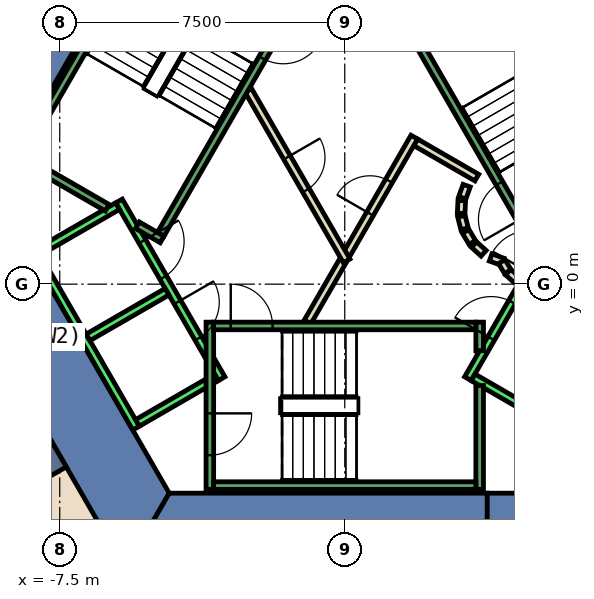
"""IFC4 building model, lengths in metres.
Left out: names, types, materials, properties, quantities, classifications, styles, units other than length and angle.
Written with IfcOpenShell. Run it as: python <this file> out.ifc"""

import sys

from ifc_helpers import new_model, si_unit, direction, frame, frame_2d, origin, place, context, subcontext, project, spatial, polyline, rectangle, outline, extrude, element, fill, save


model = new_model("IFC4")
c1 = context("Model", 3, precision=1e-05, world=origin(), true_north=direction((0.0, 1.0)))
c2 = subcontext(c1, "Body", "Model", "MODEL_VIEW")
j1 = project(units=[si_unit("LENGTHUNIT", "METRE"), si_unit("PLANEANGLEUNIT", "RADIAN")], contexts=[c1])
p1 = place(None, origin())
s1 = spatial("IfcSite", under=j1, at=p1, CompositionType="ELEMENT")
p2 = place(p1, origin())
s2 = spatial("IfcBuilding", under=s1, at=p2, CompositionType="ELEMENT")
p3 = place(p2, frame((0.0, 0.0, 281.0)))
s3 = spatial("IfcBuildingStorey", under=s2, at=p3, CompositionType="ELEMENT", Elevation=281.0)
p4 = place(p3, frame((0.0, 0.0, -0.6)))
e1 = element("IfcWall", 1, at=p4, inside=s3, PredefinedType="SHEAR", context=c2, shape_type="SweptSolid", body=[
    extrude(outline(polyline([(-10.535, 4.253), (-8.803, 3.253), (-4.619, 10.5), (-5.774, 12.5), (-10.535, 4.253)])), origin(), (0.0, 0.0, 1.0), 5.4),
])
p5 = place(p3, frame((0.0, 0.0, -0.6)))
e2 = element("IfcWall", 2, at=p5, inside=s3, PredefinedType="SHEAR", context=c2, shape_type="SweptSolid", body=[
    extrude(outline(polyline([(-11.547, 2.5), (-5.774, -7.5), (-4.619, -5.5), (-9.238, 2.5), (-11.547, 2.5)])), origin(), (0.0, 0.0, 1.0), 5.4),
])
p6 = place(p3, frame((0.0, 0.0, -0.6)))
e3 = element("IfcWall", 3, at=p6, inside=s3, PredefinedType="SHEAR", context=c2, shape_type="SweptSolid", body=[
    extrude(outline(polyline([(3.75, -7.5), (3.75, -5.5), (-4.619, -5.5), (-5.774, -7.5), (3.75, -7.5)])), origin(), (0.0, 0.0, 1.0), 5.4),
])
p7 = place(p3, frame((0.0, 0.0, 3.6)))
e4 = element("IfcWall", 4, at=p7, inside=s3, PredefinedType="SHEAR", context=c2, shape_type="SweptSolid", body=[
    extrude(outline(polyline([(5.544, -7.5), (5.544, -7.102), (4.619, -5.5), (3.75, -5.5), (3.75, -7.5), (5.544, -7.5)])), origin(), (0.0, 0.0, 1.0), 1.2),
])
p8 = place(p3, frame((-7.578, -4.375, 0.0), z_axis=(0.0, 0.0, 1.0), x_axis=(-0.866020754303, -0.500008053052, 0.0)))
e5 = element("IfcWall", 5, at=p8, inside=s3, PredefinedType="SHEAR", context=c2, shape_type="SweptSolid", body=[
    extrude(rectangle(XDim=20.374, YDim=1.0, at=frame_2d((10.187, 0.0))), origin(), (0.0, 0.0, 1.0), 4.8),
])
p9 = place(p3, frame((-0.982, -1.0, 0.0), z_axis=(0.0, 0.0, 1.0), x_axis=(0.50024047865, 0.865886518847, 0.0)))
e6 = element("IfcWall", 6, at=p9, inside=s3, PredefinedType="PARTITIONING", context=c2, shape_type="SweptSolid", body=[
    extrude(rectangle(XDim=1.863, YDim=0.2, at=frame_2d((0.931, 0.0))), origin(), (0.0, 0.0, 1.0), 4.8),
])
p10 = place(p3, frame((1.866, 3.732, 0.0), z_axis=(0.0, 0.0, 1.0), x_axis=(0.866043361281, -0.499968895414, 0.0)))
e7 = element("IfcWall", 7, at=p10, inside=s3, PredefinedType="PARTITIONING", context=c2, shape_type="SweptSolid", body=[
    extrude(rectangle(XDim=1.858, YDim=0.2, at=frame_2d((0.929, 0.0))), origin(), (0.0, 0.0, 1.0), 4.8),
])
p11 = place(p3, frame((3.208, 2.592, 0.0), z_axis=(0.0, 0.0, 1.0), x_axis=(-0.337388820924, -0.941365382578, 0.0)))
e8 = element("IfcWall", 8, at=p11, inside=s3, PredefinedType="PARTITIONING", context=c2, shape_type="SweptSolid", body=[
    extrude(rectangle(XDim=0.338, YDim=0.2, at=frame_2d((0.169, 0.0))), origin(), (0.0, 0.0, 1.0), 4.8),
])
p12 = place(p3, frame((3.079, 2.199, 0.0), z_axis=(0.0, 0.0, 1.0), x_axis=(-0.047771483479, -0.998858290933, 0.0)))
e9 = element("IfcWall", 9, at=p12, inside=s3, PredefinedType="PARTITIONING", context=c2, shape_type="SweptSolid", body=[
    extrude(rectangle(XDim=0.337, YDim=0.2, at=frame_2d((0.169, 0.0))), origin(), (0.0, 0.0, 1.0), 4.8),
])
p13 = place(p3, frame((3.07, 1.786, 0.0), z_axis=(0.0, 0.0, 1.0), x_axis=(0.242705583207, -0.970099994784, 0.0)))
e10 = element("IfcWall", 10, at=p13, inside=s3, PredefinedType="PARTITIONING", context=c2, shape_type="SweptSolid", body=[
    extrude(rectangle(XDim=0.338, YDim=0.2, at=frame_2d((0.169, 0.0))), origin(), (0.0, 0.0, 1.0), 4.8),
])
for number, where, z_axis, x_axis in (
    (11, (3.182, 1.388, 0.0), (0.0, 0.0, 1.0), (0.512, -0.859, 0.0)),
    (12, (3.404, 1.039, 0.0), (0.0, 0.0, 1.0), (0.74, -0.672, 0.0)),
):
    element("IfcWall", number, at=place(p3, frame(where, z_axis=z_axis, x_axis=x_axis)), inside=s3, PredefinedType="PARTITIONING", context=c2, shape_type="SweptSolid", body=[
        extrude(rectangle(XDim=0.338, YDim=0.2, at=frame_2d((0.169, 0.0))), origin(), (0.0, 0.0, 1.0), 4.8),
    ])
p14 = place(p3, frame((3.838, 0.702, 0.0), z_axis=(0.0, 0.0, 1.0), x_axis=(0.941035081519, -0.338308993895, 0.0)))
e13 = element("IfcWall", 13, at=p14, inside=s3, PredefinedType="PARTITIONING", context=c2, shape_type="SweptSolid", body=[
    extrude(rectangle(XDim=0.337, YDim=0.2, at=frame_2d((0.168, 0.0))), origin(), (0.0, 0.0, 1.0), 4.8),
])
p15 = place(p3, frame((4.132, 0.593, 0.0), z_axis=(0.0, 0.0, 1.0), x_axis=(0.513561617048, -0.858052717201, 0.0)))
e14 = element("IfcWall", 14, at=p15, inside=s3, PredefinedType="PARTITIONING", context=c2, shape_type="SweptSolid", body=[
    extrude(rectangle(XDim=0.308, YDim=0.2, at=frame_2d((0.154, 0.0))), origin(), (0.0, 0.0, 1.0), 4.8),
])
p16 = place(p3, frame((4.301, 0.315, 0.0), z_axis=(0.0, 0.0, 1.0), x_axis=(0.741798017506, -0.670623367639, 0.0)))
e15 = element("IfcWall", 15, at=p16, inside=s3, PredefinedType="PARTITIONING", context=c2, shape_type="SweptSolid", body=[
    extrude(rectangle(XDim=0.309, YDim=0.2, at=frame_2d((0.154, 0.0))), origin(), (0.0, 0.0, 1.0), 4.8),
])
p17 = place(p3, frame((0.05, 0.787, 0.0), z_axis=(0.0, 0.0, 1.0), x_axis=(0.499954076797, 0.866051915934, 0.0)))
e16 = element("IfcWall", 16, at=p17, inside=s3, PredefinedType="PARTITIONING", context=c2, shape_type="SweptSolid", body=[
    extrude(rectangle(XDim=3.558, YDim=0.2, at=frame_2d((1.779, 0.0))), origin(), (0.0, 0.0, 1.0), 4.8),
])
p18 = place(p17, frame((1.229, 0.0, 0.0)))
e17 = element("IfcOpeningElement", 17, at=p18, cuts=e16, PredefinedType="OPENING", context=c2, shape_type="SweptSolid", body=[
    extrude(rectangle(XDim=1.0, YDim=2.1, at=frame_2d((0.5, 1.05))), frame((0.0, 0.11, 0.0), z_axis=(0.0, -1.0, 0.0), x_axis=(1.0, 0.0, 0.0)), (0.0, 0.0, 1.0), 0.22),
])
p19 = place(p3, frame((-2.54, 5.1, 0.0), z_axis=(0.0, 0.0, 1.0), x_axis=(0.499925051871, -0.866068670783, 0.0)))
e18 = element("IfcWall", 18, at=p19, inside=s3, PredefinedType="PARTITIONING", context=c2, shape_type="SweptSolid", body=[
    extrude(rectangle(XDim=5.181, YDim=0.2, at=frame_2d((2.59, 0.0))), origin(), (0.0, 0.0, 1.0), 4.8),
])
p20 = place(p19, frame((2.04, 0.0, 0.0)))
e19 = element("IfcOpeningElement", 19, at=p20, cuts=e18, PredefinedType="OPENING", context=c2, shape_type="SweptSolid", body=[
    extrude(rectangle(XDim=1.0, YDim=2.1, at=frame_2d((0.5, 1.05))), frame((0.0, 0.11, 0.0), z_axis=(0.0, -1.0, 0.0), x_axis=(1.0, 0.0, 0.0)), (0.0, 0.0, 1.0), 0.22),
])
p21 = place(p3, frame((-5.94, 2.188, 0.0), z_axis=(0.0, 0.0, 1.0), x_axis=(0.500034260056, -0.866005622828, 0.0)))
e20 = element("IfcWall", 20, at=p21, inside=s3, PredefinedType="STANDARD", context=c2, shape_type="SweptSolid", body=[
    extrude(rectangle(XDim=5.399, YDim=0.2, at=frame_2d((2.7, 0.0))), origin(), (0.0, 0.0, 1.0), 4.8),
])
p22 = place(p21, frame((3.075, 0.0, 0.0)))
e21 = element("IfcOpeningElement", 21, at=p22, cuts=e20, PredefinedType="OPENING", context=c2, shape_type="SweptSolid", body=[
    extrude(rectangle(XDim=1.1, YDim=2.1, at=frame_2d((0.55, 1.05))), frame((0.0, 0.11, 0.0), z_axis=(0.0, -1.0, 0.0), x_axis=(1.0, 0.0, 0.0)), (0.0, 0.0, 1.0), 0.22),
])
p23 = place(p21, frame((1.225, 0.0, 0.0)))
e22 = element("IfcOpeningElement", 22, at=p23, cuts=e20, PredefinedType="OPENING", context=c2, shape_type="SweptSolid", body=[
    extrude(rectangle(XDim=1.1, YDim=2.1, at=frame_2d((0.55, 1.05))), frame((0.0, 0.11, 0.0), z_axis=(0.0, -1.0, 0.0), x_axis=(1.0, 0.0, 0.0)), (0.0, 0.0, 1.0), 0.22),
])
p24 = place(p3, frame((-8.192, 0.888, 0.0), z_axis=(0.0, 0.0, 1.0), x_axis=(0.500034260056, -0.866005622828, 0.0)))
e23 = element("IfcWall", 23, at=p24, inside=s3, PredefinedType="STANDARD", context=c2, shape_type="SweptSolid", body=[
    extrude(rectangle(XDim=5.399, YDim=0.2, at=frame_2d((2.7, 0.0))), origin(), (0.0, 0.0, 1.0), 4.8),
])
for number, where, z_axis, x_axis in (
    (24, (-5.977, 2.052, 0.0), (0.0, 0.0, 1.0), (-0.866, -0.5, 0.0)),
    (25, (-4.677, -0.2, 0.0), (0.0, 0.0, 1.0), (-0.866, -0.5, 0.0)),
):
    element("IfcWall", number, at=place(p3, frame(where, z_axis=z_axis, x_axis=x_axis)), inside=s3, PredefinedType="STANDARD", context=c2, shape_type="SweptSolid", body=[
        extrude(rectangle(XDim=2.399, YDim=0.2, at=frame_2d((1.2, 0.0))), origin(), (0.0, 0.0, 1.0), 4.8),
    ])
p25 = place(p3, frame((-3.377, -2.452, 0.0), z_axis=(0.0, 0.0, 1.0), x_axis=(-0.865955154139, -0.50012165622, 0.0)))
e26 = element("IfcWall", 26, at=p25, inside=s3, PredefinedType="STANDARD", context=c2, shape_type="SweptSolid", body=[
    extrude(rectangle(XDim=2.4, YDim=0.2, at=frame_2d((1.2, 0.0))), origin(), (0.0, 0.0, 1.0), 4.8),
])
p26 = place(p3, frame((3.24, -2.488, 0.0), z_axis=(0.0, 0.0, 1.0), x_axis=(0.500034260056, 0.866005622828, 0.0)))
e27 = element("IfcWall", 27, at=p26, inside=s3, PredefinedType="STANDARD", context=c2, shape_type="SweptSolid", body=[
    extrude(rectangle(XDim=5.399, YDim=0.2, at=frame_2d((2.7, 0.0))), origin(), (0.0, 0.0, 1.0), 4.8),
])
p27 = place(p26, frame((3.225, 0.0, 0.0)))
e28 = element("IfcOpeningElement", 28, at=p27, cuts=e27, PredefinedType="OPENING", context=c2, shape_type="SweptSolid", body=[
    extrude(rectangle(XDim=1.1, YDim=2.1, at=frame_2d((0.55, 1.05))), frame((0.0, 0.11, 0.0), z_axis=(0.0, -1.0, 0.0), x_axis=(1.0, 0.0, 0.0)), (0.0, 0.0, 1.0), 0.22),
])
p28 = place(p26, frame((1.225, 0.0, 0.0)))
e29 = element("IfcOpeningElement", 29, at=p28, cuts=e27, PredefinedType="OPENING", context=c2, shape_type="SweptSolid", body=[
    extrude(rectangle(XDim=1.1, YDim=2.1, at=frame_2d((0.55, 1.05))), frame((0.0, 0.11, 0.0), z_axis=(0.0, -1.0, 0.0), x_axis=(1.0, 0.0, 0.0)), (0.0, 0.0, 1.0), 0.22),
])
p29 = place(p3, frame((3.377, -2.452, 0.0), z_axis=(0.0, 0.0, 1.0), x_axis=(0.865955154139, -0.50012165622, 0.0)))
e30 = element("IfcWall", 30, at=p29, inside=s3, PredefinedType="STANDARD", context=c2, shape_type="SweptSolid", body=[
    extrude(rectangle(XDim=2.4, YDim=0.2, at=frame_2d((1.2, 0.0))), origin(), (0.0, 0.0, 1.0), 4.8),
])
p30 = place(p3, frame((-3.55, -1.0, 0.0), z_axis=(0.0, 0.0, 1.0), x_axis=(0.0, -1.0, 0.0)))
e31 = element("IfcWall", 31, at=p30, inside=s3, PredefinedType="STANDARD", context=c2, shape_type="SweptSolid", body=[
    extrude(rectangle(XDim=4.4, YDim=0.2, at=frame_2d((2.2, 0.0))), origin(), (0.0, 0.0, 1.0), 4.8),
])
p31 = place(p30, frame((2.4, 0.0, 0.0)))
e32 = element("IfcOpeningElement", 32, at=p31, cuts=e31, PredefinedType="OPENING", context=c2, shape_type="SweptSolid", body=[
    extrude(rectangle(XDim=1.1, YDim=2.2, at=frame_2d((0.55, 1.1))), frame((0.0, 0.11, 0.0), z_axis=(0.0, -1.0, 0.0), x_axis=(1.0, 0.0, 0.0)), (0.0, 0.0, 1.0), 0.22),
])
p32 = place(p3, frame((3.55, -2.667, 0.0), z_axis=(0.0, 0.0, 1.0), x_axis=(0.0, -1.0, 0.0)))
e33 = element("IfcWall", 33, at=p32, inside=s3, PredefinedType="STANDARD", context=c2, shape_type="SweptSolid", body=[
    extrude(rectangle(XDim=2.733, YDim=0.2, at=frame_2d((1.366, 0.0))), origin(), (0.0, 0.0, 1.0), 4.8),
])
p33 = place(p3, frame((3.55, -1.0, 0.0), z_axis=(0.0, 0.0, 1.0), x_axis=(0.0, -1.0, 0.0)))
e34 = element("IfcWall", 34, at=p33, inside=s3, PredefinedType="STANDARD", context=c2, shape_type="SweptSolid", body=[
    extrude(rectangle(XDim=0.751, YDim=0.2, at=frame_2d((0.375, 0.0))), origin(), (0.0, 0.0, 1.0), 4.8),
])
p34 = place(p3, frame((-3.45, -1.1, 0.0), z_axis=(0.0, 0.0, 1.0), x_axis=(1.0, 0.0, 0.0)))
e35 = element("IfcWall", 35, at=p34, inside=s3, PredefinedType="STANDARD", context=c2, shape_type="SweptSolid", body=[
    extrude(rectangle(XDim=6.9, YDim=0.2, at=frame_2d((3.45, 0.0))), origin(), (0.0, 0.0, 1.0), 4.8),
])
p35 = place(p34, frame((0.45, 0.0, 0.0)))
e36 = element("IfcOpeningElement", 36, at=p35, cuts=e35, PredefinedType="OPENING", context=c2, shape_type="SweptSolid", body=[
    extrude(rectangle(XDim=1.1, YDim=2.2, at=frame_2d((0.55, 1.1))), frame((0.0, 0.11, 0.0), z_axis=(0.0, -1.0, 0.0), x_axis=(1.0, 0.0, 0.0)), (0.0, 0.0, 1.0), 0.22),
])
p36 = place(p3, frame((-3.45, -5.3, 0.0), z_axis=(0.0, 0.0, 1.0), x_axis=(1.0, 0.0, 0.0)))
e37 = element("IfcWall", 37, at=p36, inside=s3, PredefinedType="STANDARD", context=c2, shape_type="SweptSolid", body=[
    extrude(rectangle(XDim=6.9, YDim=0.2, at=frame_2d((3.45, 0.0))), origin(), (0.0, 0.0, 1.0), 4.8),
])
p37 = place(p3, frame((4.843, 1.312, 0.0), z_axis=(0.0, 0.0, 1.0), x_axis=(-0.499963383562, 0.866046543262, 0.0)))
e38 = element("IfcWall", 38, at=p37, inside=s3, PredefinedType="STANDARD", context=c2, shape_type="SweptSolid", body=[
    extrude(rectangle(XDim=6.9, YDim=0.2, at=frame_2d((3.45, 0.0))), origin(), (0.0, 0.0, 1.0), 4.8),
])
p38 = place(p37, frame((0.45, 0.0, 0.0)))
e39 = element("IfcOpeningElement", 39, at=p38, cuts=e38, PredefinedType="OPENING", context=c2, shape_type="SweptSolid", body=[
    extrude(rectangle(XDim=1.1, YDim=2.2, at=frame_2d((0.55, 1.1))), frame((0.0, 0.11, 0.0), z_axis=(0.0, -1.0, 0.0), x_axis=(1.0, 0.0, 0.0)), (0.0, 0.0, 1.0), 0.22),
])
p39 = place(p3, frame((-6.25, 2.01, 0.0), z_axis=(0.0, 0.0, 1.0), x_axis=(-0.86611865017, 0.499838457731, 0.0)))
e40 = element("IfcWall", 40, at=p39, inside=s3, PredefinedType="STANDARD", context=c2, shape_type="SweptSolid", body=[
    extrude(rectangle(XDim=2.733, YDim=0.2, at=frame_2d((1.366, 0.0))), origin(), (0.0, 0.0, 1.0), 4.8),
])
p40 = place(p3, frame((-4.806, 1.176, 0.0), z_axis=(0.0, 0.0, 1.0), x_axis=(-0.866558586415, 0.499075361355, 0.0)))
e41 = element("IfcWall", 41, at=p40, inside=s3, PredefinedType="STANDARD", context=c2, shape_type="SweptSolid", body=[
    extrude(rectangle(XDim=0.751, YDim=0.2, at=frame_2d((0.376, 0.0))), origin(), (0.0, 0.0, 1.0), 4.8),
])
p41 = place(p3, frame((-1.393, 7.288, 0.0), z_axis=(0.0, 0.0, 1.0), x_axis=(-0.499963383562, -0.866046543262, 0.0)))
e42 = element("IfcWall", 42, at=p41, inside=s3, PredefinedType="STANDARD", context=c2, shape_type="SweptSolid", body=[
    extrude(rectangle(XDim=6.9, YDim=0.2, at=frame_2d((3.45, 0.0))), origin(), (0.0, 0.0, 1.0), 4.8),
])
p42 = place(p41, frame((0.45, 0.0, 0.0)))
e43 = element("IfcOpeningElement", 43, at=p42, cuts=e42, PredefinedType="OPENING", context=c2, shape_type="SweptSolid", body=[
    extrude(rectangle(XDim=1.1, YDim=2.2, at=frame_2d((0.55, 1.1))), frame((0.0, 0.11, 0.0), z_axis=(0.0, -1.0, 0.0), x_axis=(1.0, 0.0, 0.0)), (0.0, 0.0, 1.0), 0.22),
])
p43 = place(p3, frame((-5.03, 9.388, 0.0), z_axis=(0.0, 0.0, 1.0), x_axis=(-0.499978703459, -0.866037698999, 0.0)))
e44 = element("IfcWall", 44, at=p43, inside=s3, PredefinedType="STANDARD", context=c2, shape_type="SweptSolid", body=[
    extrude(rectangle(XDim=6.9, YDim=0.2, at=frame_2d((3.45, 0.0))), origin(), (0.0, 0.0, 1.0), 4.8),
])
p44 = place(p18, origin())
e45 = element("IfcDoor", 45, at=p44, inside=s3, OperationType="SINGLE_SWING_RIGHT", PredefinedType="DOOR", context=c2, shape_type="SweptSolid", body=[
    extrude(rectangle(XDim=1.0, YDim=2.1, at=frame_2d((0.5, 1.05))), frame((0.0, 0.025, 0.0), z_axis=(0.0, -1.0, 0.0), x_axis=(1.0, 0.0, 0.0)), (0.0, 0.0, 1.0), 0.05),
])
fill(e17, e45)
p45 = place(p20, origin())
e46 = element("IfcDoor", 46, at=p45, inside=s3, OperationType="SINGLE_SWING_RIGHT", PredefinedType="DOOR", context=c2, shape_type="SweptSolid", body=[
    extrude(rectangle(XDim=1.0, YDim=2.1, at=frame_2d((0.5, 1.05))), frame((0.0, 0.025, 0.0), z_axis=(0.0, -1.0, 0.0), x_axis=(1.0, 0.0, 0.0)), (0.0, 0.0, 1.0), 0.05),
])
fill(e19, e46)
p46 = place(p22, origin())
e47 = element("IfcDoor", 47, at=p46, inside=s3, OperationType="SLIDING_TO_LEFT", PredefinedType="DOOR", context=c2, shape_type="SweptSolid", body=[
    extrude(rectangle(XDim=1.1, YDim=2.1, at=frame_2d((0.55, 1.05))), frame((0.0, 0.025, 0.0), z_axis=(0.0, -1.0, 0.0), x_axis=(1.0, 0.0, 0.0)), (0.0, 0.0, 1.0), 0.05),
])
fill(e21, e47)
p47 = place(p28, origin())
e48 = element("IfcDoor", 48, at=p47, inside=s3, OperationType="SLIDING_TO_LEFT", PredefinedType="DOOR", context=c2, shape_type="SweptSolid", body=[
    extrude(rectangle(XDim=1.1, YDim=2.1, at=frame_2d((0.55, 1.05))), frame((0.0, 0.025, 0.0), z_axis=(0.0, -1.0, 0.0), x_axis=(1.0, 0.0, 0.0)), (0.0, 0.0, 1.0), 0.05),
])
fill(e29, e48)
p48 = place(p23, origin())
e49 = element("IfcDoor", 49, at=p48, inside=s3, OperationType="SLIDING_TO_LEFT", PredefinedType="DOOR", context=c2, shape_type="SweptSolid", body=[
    extrude(rectangle(XDim=1.1, YDim=2.1, at=frame_2d((0.55, 1.05))), frame((0.0, 0.025, 0.0), z_axis=(0.0, -1.0, 0.0), x_axis=(1.0, 0.0, 0.0)), (0.0, 0.0, 1.0), 0.05),
])
fill(e22, e49)
p49 = place(p35, origin())
e50 = element("IfcDoor", 50, at=p49, inside=s3, OperationType="SINGLE_SWING_LEFT", PredefinedType="DOOR", context=c2, shape_type="SweptSolid", body=[
    extrude(rectangle(XDim=1.1, YDim=2.2, at=frame_2d((0.55, 1.1))), frame((0.0, 0.025, 0.0), z_axis=(0.0, -1.0, 0.0), x_axis=(1.0, 0.0, 0.0)), (0.0, 0.0, 1.0), 0.05),
])
fill(e36, e50)
p50 = place(p31, origin())
e51 = element("IfcDoor", 51, at=p50, inside=s3, OperationType="SINGLE_SWING_LEFT", PredefinedType="DOOR", context=c2, shape_type="SweptSolid", body=[
    extrude(rectangle(XDim=1.1, YDim=2.2, at=frame_2d((0.55, 1.1))), frame((0.0, 0.025, 0.0), z_axis=(0.0, -1.0, 0.0), x_axis=(1.0, 0.0, 0.0)), (0.0, 0.0, 1.0), 0.05),
])
fill(e32, e51)
p51 = place(p38, origin())
e52 = element("IfcDoor", 52, at=p51, inside=s3, OperationType="SINGLE_SWING_LEFT", PredefinedType="DOOR", context=c2, shape_type="SweptSolid", body=[
    extrude(rectangle(XDim=1.1, YDim=2.2, at=frame_2d((0.55, 1.1))), frame((0.0, 0.025, 0.0), z_axis=(0.0, -1.0, 0.0), x_axis=(1.0, 0.0, 0.0)), (0.0, 0.0, 1.0), 0.05),
])
fill(e39, e52)
p52 = place(p42, origin())
e53 = element("IfcDoor", 53, at=p52, inside=s3, OperationType="SINGLE_SWING_LEFT", PredefinedType="DOOR", context=c2, shape_type="SweptSolid", body=[
    extrude(rectangle(XDim=1.1, YDim=2.2, at=frame_2d((0.55, 1.1))), frame((0.0, 0.025, 0.0), z_axis=(0.0, -1.0, 0.0), x_axis=(1.0, 0.0, 0.0)), (0.0, 0.0, 1.0), 0.05),
])
fill(e43, e53)
save(model, sys.argv[1])
